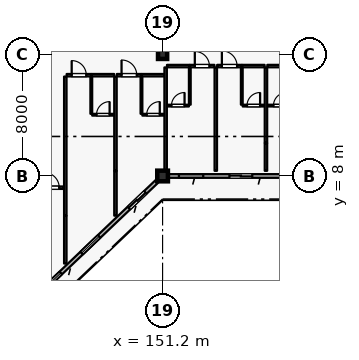
"""IFC4 building model, lengths in metres.
Left out: names, types, materials, properties, quantities, classifications, styles, units other than length and angle.
Written with IfcOpenShell. Run it as: python <this file> out.ifc"""

import sys

from ifc_helpers import new_model, si_unit, direction, frame, frame_2d, origin, origin_2d, place, context, subcontext, project, spatial, rectangle, extrude, element, fill, save


model = new_model("IFC4")
c1 = context("Model", 3, precision=1e-05, world=origin(), true_north=direction((0.0, 1.0)))
c2 = subcontext(c1, "Body", "Model", "MODEL_VIEW")
j1 = project(units=[si_unit("LENGTHUNIT", "METRE"), si_unit("PLANEANGLEUNIT", "RADIAN")], contexts=[c1])
p1 = place(None, origin())
s1 = spatial("IfcSite", under=j1, at=p1, CompositionType="ELEMENT")
p2 = place(p1, origin())
s2 = spatial("IfcBuilding", under=s1, at=p2, CompositionType="ELEMENT")
p3 = place(p2, frame((0.0, 0.0, 32.4)))
s3 = spatial("IfcBuildingStorey", under=s2, at=p3, CompositionType="ELEMENT", Elevation=32.4)
p4 = place(p3, frame((151.2, 8.0, 0.0), z_axis=(0.0, 0.0, 1.0), x_axis=(1.0, 0.0, 0.0)))
e1 = element("IfcColumn", 1, at=p4, inside=s3, PredefinedType="COLUMN", context=c2, shape_type="SweptSolid", body=[
    extrude(rectangle(XDim=0.7, YDim=0.7, at=origin_2d()), origin(), (0.0, 0.0, 1.0), 3.6),
])
p5 = place(p3, frame((151.2, 16.0, 0.0), z_axis=(0.0, 0.0, 1.0), x_axis=(1.0, 0.0, 0.0)))
e2 = element("IfcColumn", 2, at=p5, inside=s3, PredefinedType="COLUMN", context=c2, shape_type="SweptSolid", body=[
    extrude(rectangle(XDim=0.6, YDim=0.6, at=origin_2d()), origin(), (0.0, 0.0, 1.0), 3.6),
])
p6 = place(p3, frame((150.85, 7.667, 0.0), z_axis=(0.0, 0.0, 1.0), x_axis=(-0.724116091282, -0.689678103427, 0.0)))
e3 = element("IfcWall", 3, at=p6, inside=s3, PredefinedType="SOLIDWALL", context=c2, shape_type="SweptSolid", body=[
    extrude(rectangle(XDim=10.634, YDim=0.24, at=frame_2d((5.317, 0.0))), origin(), (0.0, 0.0, 1.0), 2.94),
])
p7 = place(p6, frame((1.08, 0.0, 0.0)))
e4 = element("IfcOpeningElement", 4, at=p7, cuts=e3, PredefinedType="OPENING", context=c2, shape_type="SweptSolid", body=[
    extrude(rectangle(XDim=1.5, YDim=2.25, at=frame_2d((0.75, 1.125))), frame((0.0, 0.13, 0.0), z_axis=(0.0, -1.0, 0.0), x_axis=(1.0, 0.0, 0.0)), (0.0, 0.0, 1.0), 0.26),
])
p8 = place(p6, frame((5.276, 0.0, 0.8)))
e5 = element("IfcOpeningElement", 5, at=p8, cuts=e3, PredefinedType="OPENING", context=c2, shape_type="SweptSolid", body=[
    extrude(rectangle(XDim=1.6, YDim=1.6, at=frame_2d((0.8, 0.8))), frame((0.0, 0.13, 0.0), z_axis=(0.0, -1.0, 0.0), x_axis=(1.0, 0.0, 0.0)), (0.0, 0.0, 1.0), 0.26),
])
p9 = place(p6, frame((8.764, 0.0, 0.8)))
e6 = element("IfcOpeningElement", 6, at=p9, cuts=e3, PredefinedType="OPENING", context=c2, shape_type="SweptSolid", body=[
    extrude(rectangle(XDim=1.6, YDim=1.6, at=frame_2d((0.8, 0.8))), frame((0.0, 0.13, 0.0), z_axis=(0.0, -1.0, 0.0), x_axis=(1.0, 0.0, 0.0)), (0.0, 0.0, 1.0), 0.26),
])
p10 = place(p3, frame((159.25, 8.0, 0.0), z_axis=(0.0, 0.0, 1.0), x_axis=(-1.0, 0.0, 0.0)))
e7 = element("IfcWall", 7, at=p10, inside=s3, PredefinedType="SOLIDWALL", context=c2, shape_type="SweptSolid", body=[
    extrude(rectangle(XDim=7.7, YDim=0.24, at=frame_2d((3.85, 0.0))), origin(), (0.0, 0.0, 1.0), 2.94),
])
p11 = place(p10, frame((2.15, 0.0, 0.0)))
e8 = element("IfcOpeningElement", 8, at=p11, cuts=e7, PredefinedType="OPENING", context=c2, shape_type="SweptSolid", body=[
    extrude(rectangle(XDim=1.5, YDim=2.25, at=frame_2d((0.75, 1.125))), frame((0.0, 0.13, 0.0), z_axis=(0.0, -1.0, 0.0), x_axis=(1.0, 0.0, 0.0)), (0.0, 0.0, 1.0), 0.26),
])
p12 = place(p10, frame((5.375, 0.0, 0.8)))
e9 = element("IfcOpeningElement", 9, at=p12, cuts=e7, PredefinedType="OPENING", context=c2, shape_type="SweptSolid", body=[
    extrude(rectangle(XDim=1.6, YDim=1.6, at=frame_2d((0.8, 0.8))), frame((0.0, 0.13, 0.0), z_axis=(0.0, -1.0, 0.0), x_axis=(1.0, 0.0, 0.0)), (0.0, 0.0, 1.0), 0.26),
])
p13 = place(p3, frame((143.09, 7.23, 0.0), z_axis=(0.0, 0.0, 1.0), x_axis=(1.0, 0.0, 0.0)))
e10 = element("IfcWall", 10, at=p13, inside=s3, PredefinedType="PARTITIONING", context=c2, shape_type="SweptSolid", body=[
    extrude(rectangle(XDim=1.62, YDim=0.16, at=frame_2d((0.81, 0.0))), origin(), (0.0, 0.0, 1.0), 3.335),
])
p14 = place(p13, frame((0.31, 0.0, 0.0)))
e11 = element("IfcOpeningElement", 11, at=p14, cuts=e10, PredefinedType="OPENING", context=c2, shape_type="SweptSolid", body=[
    extrude(rectangle(XDim=1.0, YDim=2.25, at=frame_2d((0.5, 1.125))), frame((0.0, 0.09, 0.0), z_axis=(0.0, -1.0, 0.0), x_axis=(1.0, 0.0, 0.0)), (0.0, 0.0, 1.0), 0.18),
])
p15 = place(p3, frame((144.8, 2.24, 0.0), z_axis=(0.0, 0.0, 1.0), x_axis=(0.0, 1.0, 0.0)))
e12 = element("IfcWall", 12, at=p15, inside=s3, PredefinedType="PARTITIONING", context=c2, shape_type="SweptSolid", body=[
    extrude(rectangle(XDim=3.14, YDim=0.16, at=frame_2d((1.57, 0.0))), origin(), (0.0, 0.0, 1.0), 3.335),
])
p16 = place(p3, frame((144.89, 14.63, 0.0), z_axis=(0.0, 0.0, 1.0), x_axis=(1.0, 0.0, 0.0)))
e13 = element("IfcWall", 13, at=p16, inside=s3, PredefinedType="PARTITIONING", context=c2, shape_type="SweptSolid", body=[
    extrude(rectangle(XDim=1.62, YDim=0.16, at=frame_2d((0.81, 0.0))), origin(), (0.0, 0.0, 1.0), 3.335),
])
p17 = place(p16, frame((0.33, 0.0, 0.0)))
e14 = element("IfcOpeningElement", 14, at=p17, cuts=e13, PredefinedType="OPENING", context=c2, shape_type="SweptSolid", body=[
    extrude(rectangle(XDim=0.96, YDim=2.2, at=frame_2d((0.48, 1.1))), frame((0.0, 0.09, 0.0), z_axis=(0.0, -1.0, 0.0), x_axis=(1.0, 0.0, 0.0)), (0.0, 0.0, 1.0), 0.18),
])
p18 = place(p3, frame((146.52, 14.63, 0.0), z_axis=(0.0, 0.0, 1.0), x_axis=(1.0, 0.0, 0.0)))
e15 = element("IfcWall", 15, at=p18, inside=s3, PredefinedType="PARTITIONING", context=c2, shape_type="SweptSolid", body=[
    extrude(rectangle(XDim=1.49, YDim=0.16, at=frame_2d((0.745, 0.0))), origin(), (0.0, 0.0, 1.0), 3.335),
])
p19 = place(p3, frame((146.51, 12.09, 0.0), z_axis=(0.0, 0.0, 1.0), x_axis=(0.0, 1.0, 0.0)))
e16 = element("IfcWall", 16, at=p19, inside=s3, PredefinedType="PARTITIONING", context=c2, shape_type="SweptSolid", body=[
    extrude(rectangle(XDim=2.45, YDim=0.115, at=frame_2d((1.225, 0.0))), origin(), (0.0, 0.0, 1.0), 3.335),
])
p20 = place(p3, frame((146.57, 12.03, 0.0), z_axis=(0.0, 0.0, 1.0), x_axis=(1.0, 0.0, 0.0)))
e17 = element("IfcWall", 17, at=p20, inside=s3, PredefinedType="PARTITIONING", context=c2, shape_type="SweptSolid", body=[
    extrude(rectangle(XDim=1.43, YDim=0.115, at=frame_2d((0.715, 0.0))), origin(), (0.0, 0.0, 1.0), 3.335),
])
p21 = place(p20, frame((0.285, 0.0, 0.0)))
e18 = element("IfcOpeningElement", 18, at=p21, cuts=e17, PredefinedType="OPENING", context=c2, shape_type="SweptSolid", body=[
    extrude(rectangle(XDim=0.86, YDim=2.12, at=frame_2d((0.43, 1.06))), frame((0.0, 0.067, 0.0), z_axis=(0.0, -1.0, 0.0), x_axis=(1.0, 0.0, 0.0)), (0.0, 0.0, 1.0), 0.135),
])
p22 = place(p3, frame((144.8, 5.39, 0.0), z_axis=(0.0, 0.0, 1.0), x_axis=(0.0, 1.0, 0.0)))
e19 = element("IfcWall", 19, at=p22, inside=s3, PredefinedType="PARTITIONING", context=c2, shape_type="SweptSolid", body=[
    extrude(rectangle(XDim=9.15, YDim=0.16, at=frame_2d((4.575, 0.0))), origin(), (0.0, 0.0, 1.0), 3.335),
])
p23 = place(p3, frame((148.1, 5.39, 0.0), z_axis=(0.0, 0.0, 1.0), x_axis=(0.0, 1.0, 0.0)))
e20 = element("IfcWall", 20, at=p23, inside=s3, PredefinedType="PARTITIONING", context=c2, shape_type="SweptSolid", body=[
    extrude(rectangle(XDim=2.94, YDim=0.16, at=frame_2d((1.47, 0.0))), origin(), (0.0, 0.0, 1.0), 3.335),
])
p24 = place(p3, frame((148.19, 14.63, 0.0), z_axis=(0.0, 0.0, 1.0), x_axis=(1.0, 0.0, 0.0)))
e21 = element("IfcWall", 21, at=p24, inside=s3, PredefinedType="PARTITIONING", context=c2, shape_type="SweptSolid", body=[
    extrude(rectangle(XDim=1.62, YDim=0.16, at=frame_2d((0.81, 0.0))), origin(), (0.0, 0.0, 1.0), 3.335),
])
p25 = place(p24, frame((0.31, 0.0, 0.0)))
e22 = element("IfcOpeningElement", 22, at=p25, cuts=e21, PredefinedType="OPENING", context=c2, shape_type="SweptSolid", body=[
    extrude(rectangle(XDim=1.0, YDim=2.25, at=frame_2d((0.5, 1.125))), frame((0.0, 0.09, 0.0), z_axis=(0.0, -1.0, 0.0), x_axis=(1.0, 0.0, 0.0)), (0.0, 0.0, 1.0), 0.18),
])
p26 = place(p3, frame((149.82, 14.63, 0.0), z_axis=(0.0, 0.0, 1.0), x_axis=(1.0, 0.0, 0.0)))
e23 = element("IfcWall", 23, at=p26, inside=s3, PredefinedType="PARTITIONING", context=c2, shape_type="SweptSolid", body=[
    extrude(rectangle(XDim=1.49, YDim=0.16, at=frame_2d((0.745, 0.0))), origin(), (0.0, 0.0, 1.0), 3.335),
])
p27 = place(p3, frame((149.81, 12.09, 0.0), z_axis=(0.0, 0.0, 1.0), x_axis=(0.0, 1.0, 0.0)))
e24 = element("IfcWall", 24, at=p27, inside=s3, PredefinedType="PARTITIONING", context=c2, shape_type="SweptSolid", body=[
    extrude(rectangle(XDim=2.45, YDim=0.115, at=frame_2d((1.225, 0.0))), origin(), (0.0, 0.0, 1.0), 3.335),
])
p28 = place(p3, frame((149.87, 12.03, 0.0), z_axis=(0.0, 0.0, 1.0), x_axis=(1.0, 0.0, 0.0)))
e25 = element("IfcWall", 25, at=p28, inside=s3, PredefinedType="PARTITIONING", context=c2, shape_type="SweptSolid", body=[
    extrude(rectangle(XDim=1.43, YDim=0.115, at=frame_2d((0.715, 0.0))), origin(), (0.0, 0.0, 1.0), 3.335),
])
p29 = place(p28, frame((0.285, 0.0, 0.0)))
e26 = element("IfcOpeningElement", 26, at=p29, cuts=e25, PredefinedType="OPENING", context=c2, shape_type="SweptSolid", body=[
    extrude(rectangle(XDim=0.86, YDim=2.12, at=frame_2d((0.43, 1.06))), frame((0.0, 0.067, 0.0), z_axis=(0.0, -1.0, 0.0), x_axis=(1.0, 0.0, 0.0)), (0.0, 0.0, 1.0), 0.135),
])
p30 = place(p3, frame((148.1, 8.34, 0.0), z_axis=(0.0, 0.0, 1.0), x_axis=(0.0, 1.0, 0.0)))
e27 = element("IfcWall", 27, at=p30, inside=s3, PredefinedType="PARTITIONING", context=c2, shape_type="SweptSolid", body=[
    extrude(rectangle(XDim=6.2, YDim=0.16, at=frame_2d((3.1, 0.0))), origin(), (0.0, 0.0, 1.0), 3.335),
])
p31 = place(p3, frame((151.49, 15.23, 0.0), z_axis=(0.0, 0.0, 1.0), x_axis=(1.0, 0.0, 0.0)))
e28 = element("IfcWall", 28, at=p31, inside=s3, PredefinedType="PARTITIONING", context=c2, shape_type="SweptSolid", body=[
    extrude(rectangle(XDim=1.49, YDim=0.16, at=frame_2d((0.745, 0.0))), origin(), (0.0, 0.0, 1.0), 3.335),
])
p32 = place(p3, frame((152.99, 15.23, 0.0), z_axis=(0.0, 0.0, 1.0), x_axis=(1.0, 0.0, 0.0)))
e29 = element("IfcWall", 29, at=p32, inside=s3, PredefinedType="PARTITIONING", context=c2, shape_type="SweptSolid", body=[
    extrude(rectangle(XDim=1.62, YDim=0.16, at=frame_2d((0.81, 0.0))), origin(), (0.0, 0.0, 1.0), 3.335),
])
p33 = place(p32, frame((0.33, 0.0, 0.0)))
e30 = element("IfcOpeningElement", 30, at=p33, cuts=e29, PredefinedType="OPENING", context=c2, shape_type="SweptSolid", body=[
    extrude(rectangle(XDim=0.96, YDim=2.2, at=frame_2d((0.48, 1.1))), frame((0.0, 0.09, 0.0), z_axis=(0.0, -1.0, 0.0), x_axis=(1.0, 0.0, 0.0)), (0.0, 0.0, 1.0), 0.18),
])
p34 = place(p3, frame((152.99, 12.69, 0.0), z_axis=(0.0, 0.0, 1.0), x_axis=(0.0, 1.0, 0.0)))
e31 = element("IfcWall", 31, at=p34, inside=s3, PredefinedType="PARTITIONING", context=c2, shape_type="SweptSolid", body=[
    extrude(rectangle(XDim=2.45, YDim=0.115, at=frame_2d((1.225, 0.0))), origin(), (0.0, 0.0, 1.0), 3.335),
])
p35 = place(p3, frame((151.5, 12.63, 0.0), z_axis=(0.0, 0.0, 1.0), x_axis=(1.0, 0.0, 0.0)))
e32 = element("IfcWall", 32, at=p35, inside=s3, PredefinedType="PARTITIONING", context=c2, shape_type="SweptSolid", body=[
    extrude(rectangle(XDim=1.43, YDim=0.115, at=frame_2d((0.715, 0.0))), origin(), (0.0, 0.0, 1.0), 3.335),
])
p36 = place(p35, frame((0.285, 0.0, 0.0)))
e33 = element("IfcOpeningElement", 33, at=p36, cuts=e32, PredefinedType="OPENING", context=c2, shape_type="SweptSolid", body=[
    extrude(rectangle(XDim=0.86, YDim=2.12, at=frame_2d((0.43, 1.06))), frame((0.0, 0.067, 0.0), z_axis=(0.0, -1.0, 0.0), x_axis=(1.0, 0.0, 0.0)), (0.0, 0.0, 1.0), 0.135),
])
p37 = place(p3, frame((151.4, 8.34, 0.0), z_axis=(0.0, 0.0, 1.0), x_axis=(0.0, 1.0, 0.0)))
e34 = element("IfcWall", 34, at=p37, inside=s3, PredefinedType="PARTITIONING", context=c2, shape_type="SweptSolid", body=[
    extrude(rectangle(XDim=6.8, YDim=0.16, at=frame_2d((3.4, 0.0))), origin(), (0.0, 0.0, 1.0), 2.74),
])
p38 = place(p3, frame((154.79, 15.23, 0.0), z_axis=(0.0, 0.0, 1.0), x_axis=(1.0, 0.0, 0.0)))
e35 = element("IfcWall", 35, at=p38, inside=s3, PredefinedType="PARTITIONING", context=c2, shape_type="SweptSolid", body=[
    extrude(rectangle(XDim=1.62, YDim=0.16, at=frame_2d((0.81, 0.0))), origin(), (0.0, 0.0, 1.0), 3.335),
])
p39 = place(p38, frame((0.31, 0.0, 0.0)))
e36 = element("IfcOpeningElement", 36, at=p39, cuts=e35, PredefinedType="OPENING", context=c2, shape_type="SweptSolid", body=[
    extrude(rectangle(XDim=1.0, YDim=2.25, at=frame_2d((0.5, 1.125))), frame((0.0, 0.09, 0.0), z_axis=(0.0, -1.0, 0.0), x_axis=(1.0, 0.0, 0.0)), (0.0, 0.0, 1.0), 0.18),
])
p40 = place(p3, frame((156.42, 15.23, 0.0), z_axis=(0.0, 0.0, 1.0), x_axis=(1.0, 0.0, 0.0)))
e37 = element("IfcWall", 37, at=p40, inside=s3, PredefinedType="PARTITIONING", context=c2, shape_type="SweptSolid", body=[
    extrude(rectangle(XDim=1.49, YDim=0.16, at=frame_2d((0.745, 0.0))), origin(), (0.0, 0.0, 1.0), 3.335),
])
p41 = place(p3, frame((156.41, 12.69, 0.0), z_axis=(0.0, 0.0, 1.0), x_axis=(0.0, 1.0, 0.0)))
e38 = element("IfcWall", 38, at=p41, inside=s3, PredefinedType="PARTITIONING", context=c2, shape_type="SweptSolid", body=[
    extrude(rectangle(XDim=2.45, YDim=0.115, at=frame_2d((1.225, 0.0))), origin(), (0.0, 0.0, 1.0), 3.335),
])
p42 = place(p3, frame((156.47, 12.63, 0.0), z_axis=(0.0, 0.0, 1.0), x_axis=(1.0, 0.0, 0.0)))
e39 = element("IfcWall", 39, at=p42, inside=s3, PredefinedType="PARTITIONING", context=c2, shape_type="SweptSolid", body=[
    extrude(rectangle(XDim=1.43, YDim=0.115, at=frame_2d((0.715, 0.0))), origin(), (0.0, 0.0, 1.0), 3.335),
])
p43 = place(p42, frame((0.285, 0.0, 0.0)))
e40 = element("IfcOpeningElement", 40, at=p43, cuts=e39, PredefinedType="OPENING", context=c2, shape_type="SweptSolid", body=[
    extrude(rectangle(XDim=0.86, YDim=2.12, at=frame_2d((0.43, 1.06))), frame((0.0, 0.067, 0.0), z_axis=(0.0, -1.0, 0.0), x_axis=(1.0, 0.0, 0.0)), (0.0, 0.0, 1.0), 0.135),
])
p44 = place(p3, frame((154.7, 8.34, 0.0), z_axis=(0.0, 0.0, 1.0), x_axis=(0.0, 1.0, 0.0)))
e41 = element("IfcWall", 41, at=p44, inside=s3, PredefinedType="PARTITIONING", context=c2, shape_type="SweptSolid", body=[
    extrude(rectangle(XDim=6.8, YDim=0.16, at=frame_2d((3.4, 0.0))), origin(), (0.0, 0.0, 1.0), 3.335),
])
p45 = place(p3, frame((158.0, 8.34, 0.0), z_axis=(0.0, 0.0, 1.0), x_axis=(0.0, 1.0, 0.0)))
e42 = element("IfcWall", 42, at=p45, inside=s3, PredefinedType="PARTITIONING", context=c2, shape_type="SweptSolid", body=[
    extrude(rectangle(XDim=1.82, YDim=0.16, at=frame_2d((0.91, 0.0))), origin(), (0.0, 0.0, 1.0), 3.335),
])
p46 = place(p3, frame((158.09, 15.23, 0.0), z_axis=(0.0, 0.0, 1.0), x_axis=(1.0, 0.0, 0.0)))
e43 = element("IfcWall", 43, at=p46, inside=s3, PredefinedType="PARTITIONING", context=c2, shape_type="SweptSolid", body=[
    extrude(rectangle(XDim=1.71, YDim=0.16, at=frame_2d((0.855, 0.0))), origin(), (0.0, 0.0, 1.0), 3.335),
])
p47 = place(p3, frame((158.1, 12.63, 0.0), z_axis=(0.0, 0.0, 1.0), x_axis=(1.0, 0.0, 0.0)))
e44 = element("IfcWall", 44, at=p47, inside=s3, PredefinedType="PARTITIONING", context=c2, shape_type="SweptSolid", body=[
    extrude(rectangle(XDim=1.65, YDim=0.115, at=frame_2d((0.825, 0.0))), origin(), (0.0, 0.0, 1.0), 3.335),
])
p48 = place(p47, frame((0.395, 0.0, 0.0)))
e45 = element("IfcOpeningElement", 45, at=p48, cuts=e44, PredefinedType="OPENING", context=c2, shape_type="SweptSolid", body=[
    extrude(rectangle(XDim=0.86, YDim=2.12, at=frame_2d((0.43, 1.06))), frame((0.0, 0.067, 0.0), z_axis=(0.0, -1.0, 0.0), x_axis=(1.0, 0.0, 0.0)), (0.0, 0.0, 1.0), 0.135),
])
p49 = place(p3, frame((158.0, 10.17, 0.0), z_axis=(0.0, 0.0, 1.0), x_axis=(0.0, 1.0, 0.0)))
e46 = element("IfcWall", 46, at=p49, inside=s3, PredefinedType="PARTITIONING", context=c2, shape_type="SweptSolid", body=[
    extrude(rectangle(XDim=4.97, YDim=0.16, at=frame_2d((2.485, 0.0))), origin(), (0.0, 0.0, 1.0), 3.335),
])
p50 = place(p7, origin())
e47 = element("IfcDoor", 47, at=p50, inside=s3, OperationType="SLIDING_TO_LEFT", PredefinedType="DOOR", context=c2, shape_type="SweptSolid", body=[
    extrude(rectangle(XDim=1.5, YDim=2.25, at=frame_2d((0.75, 1.125))), frame((0.0, 0.025, 0.0), z_axis=(0.0, -1.0, 0.0), x_axis=(1.0, 0.0, 0.0)), (0.0, 0.0, 1.0), 0.05),
])
fill(e4, e47)
p51 = place(p8, origin())
e48 = element("IfcWindow", 48, at=p51, inside=s3, PartitioningType="SINGLE_PANEL", PredefinedType="WINDOW", context=c2, shape_type="SweptSolid", body=[
    extrude(rectangle(XDim=1.6, YDim=1.6, at=frame_2d((0.8, 0.8))), frame((0.0, 0.03, 0.0), z_axis=(0.0, -1.0, 0.0), x_axis=(1.0, 0.0, 0.0)), (0.0, 0.0, 1.0), 0.06),
])
fill(e5, e48)
p52 = place(p9, origin())
e49 = element("IfcWindow", 49, at=p52, inside=s3, PartitioningType="SINGLE_PANEL", PredefinedType="WINDOW", context=c2, shape_type="SweptSolid", body=[
    extrude(rectangle(XDim=1.6, YDim=1.6, at=frame_2d((0.8, 0.8))), frame((0.0, 0.03, 0.0), z_axis=(0.0, -1.0, 0.0), x_axis=(1.0, 0.0, 0.0)), (0.0, 0.0, 1.0), 0.06),
])
fill(e6, e49)
p53 = place(p11, origin())
e50 = element("IfcDoor", 50, at=p53, inside=s3, OperationType="SLIDING_TO_LEFT", PredefinedType="DOOR", context=c2, shape_type="SweptSolid", body=[
    extrude(rectangle(XDim=1.5, YDim=2.25, at=frame_2d((0.75, 1.125))), frame((0.0, 0.025, 0.0), z_axis=(0.0, -1.0, 0.0), x_axis=(1.0, 0.0, 0.0)), (0.0, 0.0, 1.0), 0.05),
])
fill(e8, e50)
p54 = place(p12, origin())
e51 = element("IfcWindow", 51, at=p54, inside=s3, PartitioningType="SINGLE_PANEL", PredefinedType="WINDOW", context=c2, shape_type="SweptSolid", body=[
    extrude(rectangle(XDim=1.6, YDim=1.6, at=frame_2d((0.8, 0.8))), frame((0.0, 0.03, 0.0), z_axis=(0.0, -1.0, 0.0), x_axis=(1.0, 0.0, 0.0)), (0.0, 0.0, 1.0), 0.06),
])
fill(e9, e51)
p55 = place(p14, origin())
e52 = element("IfcDoor", 52, at=p55, inside=s3, OperationType="SINGLE_SWING_LEFT", PredefinedType="DOOR", context=c2, shape_type="SweptSolid", body=[
    extrude(rectangle(XDim=1.0, YDim=2.25, at=frame_2d((0.5, 1.125))), frame((0.0, 0.025, 0.0), z_axis=(0.0, -1.0, 0.0), x_axis=(1.0, 0.0, 0.0)), (0.0, 0.0, 1.0), 0.05),
])
fill(e11, e52)
p56 = place(p17, origin())
e53 = element("IfcDoor", 53, at=p56, inside=s3, OperationType="SINGLE_SWING_LEFT", PredefinedType="DOOR", context=c2, shape_type="SweptSolid", body=[
    extrude(rectangle(XDim=0.96, YDim=2.2, at=frame_2d((0.48, 1.1))), frame((0.0, 0.025, 0.0), z_axis=(0.0, -1.0, 0.0), x_axis=(1.0, 0.0, 0.0)), (0.0, 0.0, 1.0), 0.05),
])
fill(e14, e53)
p57 = place(p21, origin())
e54 = element("IfcDoor", 54, at=p57, inside=s3, OperationType="SINGLE_SWING_RIGHT", PredefinedType="DOOR", context=c2, shape_type="SweptSolid", body=[
    extrude(rectangle(XDim=0.86, YDim=2.12, at=frame_2d((0.43, 1.06))), frame((0.0, 0.025, 0.0), z_axis=(0.0, -1.0, 0.0), x_axis=(1.0, 0.0, 0.0)), (0.0, 0.0, 1.0), 0.05),
])
fill(e18, e54)
p58 = place(p25, origin())
e55 = element("IfcDoor", 55, at=p58, inside=s3, OperationType="SINGLE_SWING_LEFT", PredefinedType="DOOR", context=c2, shape_type="SweptSolid", body=[
    extrude(rectangle(XDim=1.0, YDim=2.25, at=frame_2d((0.5, 1.125))), frame((0.0, 0.025, 0.0), z_axis=(0.0, -1.0, 0.0), x_axis=(1.0, 0.0, 0.0)), (0.0, 0.0, 1.0), 0.05),
])
fill(e22, e55)
p59 = place(p29, origin())
e56 = element("IfcDoor", 56, at=p59, inside=s3, OperationType="SINGLE_SWING_RIGHT", PredefinedType="DOOR", context=c2, shape_type="SweptSolid", body=[
    extrude(rectangle(XDim=0.86, YDim=2.12, at=frame_2d((0.43, 1.06))), frame((0.0, 0.025, 0.0), z_axis=(0.0, -1.0, 0.0), x_axis=(1.0, 0.0, 0.0)), (0.0, 0.0, 1.0), 0.05),
])
fill(e26, e56)
p60 = place(p33, origin())
e57 = element("IfcDoor", 57, at=p60, inside=s3, OperationType="SINGLE_SWING_LEFT", PredefinedType="DOOR", context=c2, shape_type="SweptSolid", body=[
    extrude(rectangle(XDim=0.96, YDim=2.2, at=frame_2d((0.48, 1.1))), frame((0.0, 0.025, 0.0), z_axis=(0.0, -1.0, 0.0), x_axis=(1.0, 0.0, 0.0)), (0.0, 0.0, 1.0), 0.05),
])
fill(e30, e57)
p61 = place(p36, origin())
e58 = element("IfcDoor", 58, at=p61, inside=s3, OperationType="SINGLE_SWING_RIGHT", PredefinedType="DOOR", context=c2, shape_type="SweptSolid", body=[
    extrude(rectangle(XDim=0.86, YDim=2.12, at=frame_2d((0.43, 1.06))), frame((0.0, 0.025, 0.0), z_axis=(0.0, -1.0, 0.0), x_axis=(1.0, 0.0, 0.0)), (0.0, 0.0, 1.0), 0.05),
])
fill(e33, e58)
p62 = place(p39, origin())
e59 = element("IfcDoor", 59, at=p62, inside=s3, OperationType="SINGLE_SWING_LEFT", PredefinedType="DOOR", context=c2, shape_type="SweptSolid", body=[
    extrude(rectangle(XDim=1.0, YDim=2.25, at=frame_2d((0.5, 1.125))), frame((0.0, 0.025, 0.0), z_axis=(0.0, -1.0, 0.0), x_axis=(1.0, 0.0, 0.0)), (0.0, 0.0, 1.0), 0.05),
])
fill(e36, e59)
p63 = place(p43, origin())
e60 = element("IfcDoor", 60, at=p63, inside=s3, OperationType="SINGLE_SWING_RIGHT", PredefinedType="DOOR", context=c2, shape_type="SweptSolid", body=[
    extrude(rectangle(XDim=0.86, YDim=2.12, at=frame_2d((0.43, 1.06))), frame((0.0, 0.025, 0.0), z_axis=(0.0, -1.0, 0.0), x_axis=(1.0, 0.0, 0.0)), (0.0, 0.0, 1.0), 0.05),
])
fill(e40, e60)
p64 = place(p48, origin())
e61 = element("IfcDoor", 61, at=p64, inside=s3, OperationType="SINGLE_SWING_RIGHT", PredefinedType="DOOR", context=c2, shape_type="SweptSolid", body=[
    extrude(rectangle(XDim=0.86, YDim=2.12, at=frame_2d((0.43, 1.06))), frame((0.0, 0.025, 0.0), z_axis=(0.0, -1.0, 0.0), x_axis=(1.0, 0.0, 0.0)), (0.0, 0.0, 1.0), 0.05),
])
fill(e45, e61)
save(model, sys.argv[1])
